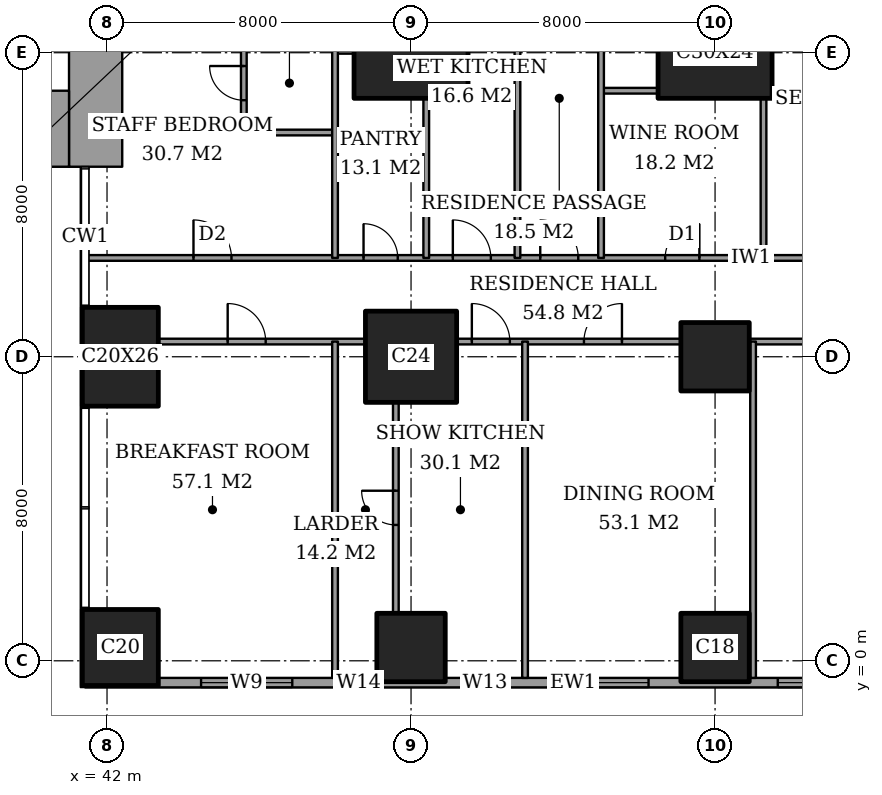
"""IFC4 building model, lengths in metres.
Left out: names, types, materials, properties, quantities, classifications, styles, units other than length and angle.
Written with IfcOpenShell. Run it as: python <this file> out.ifc"""

import sys

from ifc_helpers import new_model, si_unit, direction, frame, frame_2d, origin, origin_2d, place, context, subcontext, project, spatial, rectangle, extrude, element, fill, save


model = new_model("IFC4")
c1 = context("Model", 3, precision=1e-05, world=origin(), true_north=direction((0.0, 1.0)))
c2 = subcontext(c1, "Body", "Model", "MODEL_VIEW")
j1 = project(units=[si_unit("LENGTHUNIT", "METRE"), si_unit("PLANEANGLEUNIT", "RADIAN")], contexts=[c1])
p1 = place(None, origin())
s1 = spatial("IfcSite", under=j1, at=p1, CompositionType="ELEMENT")
p2 = place(p1, origin())
s2 = spatial("IfcBuilding", under=s1, at=p2, CompositionType="ELEMENT")
p3 = place(p2, frame((0.0, 0.0, 193.0)))
s3 = spatial("IfcBuildingStorey", under=s2, at=p3, CompositionType="ELEMENT", Elevation=193.0)
p4 = place(p3, frame((42.35, 0.35, 0.0), z_axis=(0.0, 0.0, 1.0), x_axis=(1.0, 0.0, 0.0)))
e1 = element("IfcColumn", 1, at=p4, inside=s3, PredefinedType="COLUMN", context=c2, shape_type="SweptSolid", body=[
    extrude(rectangle(XDim=2.0, YDim=2.0, at=origin_2d()), origin(), (0.0, 0.0, 1.0), 3.6),
])
p5 = place(p3, frame((42.35, 8.0, 0.0), z_axis=(0.0, 0.0, 1.0), x_axis=(1.0, 0.0, 0.0)))
e2 = element("IfcColumn", 2, at=p5, inside=s3, PredefinedType="COLUMN", context=c2, shape_type="SweptSolid", body=[
    extrude(rectangle(XDim=2.0, YDim=2.6, at=origin_2d()), origin(), (0.0, 0.0, 1.0), 3.6),
])
p6 = place(p3, frame((50.0, 0.35, 0.0), z_axis=(0.0, 0.0, 1.0), x_axis=(1.0, 0.0, 0.0)))
e3 = element("IfcColumn", 3, at=p6, inside=s3, PredefinedType="COLUMN", context=c2, shape_type="SweptSolid", body=[
    extrude(rectangle(XDim=1.8, YDim=1.8, at=origin_2d()), origin(), (0.0, 0.0, 1.0), 3.6),
])
p7 = place(p3, frame((50.0, 8.0, 0.0), z_axis=(0.0, 0.0, 1.0), x_axis=(1.0, 0.0, 0.0)))
e4 = element("IfcColumn", 4, at=p7, inside=s3, PredefinedType="COLUMN", context=c2, shape_type="SweptSolid", body=[
    extrude(rectangle(XDim=2.4, YDim=2.4, at=origin_2d()), origin(), (0.0, 0.0, 1.0), 3.6),
])
p8 = place(p3, frame((50.0, 16.0, 0.0), z_axis=(0.0, 0.0, 1.0), x_axis=(1.0, 0.0, 0.0)))
e5 = element("IfcColumn", 5, at=p8, inside=s3, PredefinedType="COLUMN", context=c2, shape_type="SweptSolid", body=[
    extrude(rectangle(XDim=3.0, YDim=2.4, at=origin_2d()), origin(), (0.0, 0.0, 1.0), 3.6),
])
for number, where, z_axis, x_axis in (
    (6, (58.0, 0.35, 0.0), (0.0, 0.0, 1.0), (1.0, 0.0, 0.0)),
    (7, (58.0, 8.0, 0.0), (0.0, 0.0, 1.0), (1.0, 0.0, 0.0)),
):
    element("IfcColumn", number, at=place(p3, frame(where, z_axis=z_axis, x_axis=x_axis)), inside=s3, PredefinedType="COLUMN", context=c2, shape_type="SweptSolid", body=[
        extrude(rectangle(XDim=1.8, YDim=1.8, at=origin_2d()), origin(), (0.0, 0.0, 1.0), 3.6),
    ])
p9 = place(p3, frame((58.0, 16.0, 0.0), z_axis=(0.0, 0.0, 1.0), x_axis=(1.0, 0.0, 0.0)))
e8 = element("IfcColumn", 8, at=p9, inside=s3, PredefinedType="COLUMN", context=c2, shape_type="SweptSolid", body=[
    extrude(rectangle(XDim=3.0, YDim=2.4, at=origin_2d()), origin(), (0.0, 0.0, 1.0), 3.6),
])
p10 = place(p3, frame((37.85, 14.0, 0.0), z_axis=(0.0, 0.0, 1.0), x_axis=(1.0, 0.0, 0.0)))
e9 = element("IfcWall", 9, at=p10, inside=s3, PredefinedType="SHEAR", context=c2, shape_type="SweptSolid", body=[
    extrude(rectangle(XDim=3.15, YDim=2.0, at=frame_2d((1.575, 0.0))), origin(), (0.0, 0.0, 1.0), 3.6),
])
p11 = place(p3, frame((41.7, 13.0, 0.0), z_axis=(0.0, 0.0, 1.0), x_axis=(0.0, 1.0, 0.0)))
e10 = element("IfcWall", 10, at=p11, inside=s3, PredefinedType="SHEAR", context=c2, shape_type="SweptSolid", body=[
    extrude(rectangle(XDim=11.85, YDim=1.4, at=frame_2d((5.925, 0.0))), origin(), (0.0, 0.0, 1.0), 3.6),
])
p12 = place(p11, frame((7.5, 0.0, 0.0)))
e11 = element("IfcOpeningElement", 11, at=p12, cuts=e10, PredefinedType="OPENING", context=c2, shape_type="SweptSolid", body=[
    extrude(rectangle(XDim=1.8, YDim=2.4, at=frame_2d((0.9, 1.2))), frame((0.0, 0.71, 0.0), z_axis=(0.0, -1.0, 0.0), x_axis=(1.0, 0.0, 0.0)), (0.0, 0.0, 1.0), 1.42),
])
p13 = place(p3, frame((41.425, -0.575, 0.0), z_axis=(0.0, 0.0, 1.0), x_axis=(1.0, 0.0, 0.0)))
e12 = element("IfcWall", 12, at=p13, inside=s3, PredefinedType="SOLIDWALL", context=c2, shape_type="SweptSolid", body=[
    extrude(rectangle(XDim=21.4, YDim=0.25, at=frame_2d((10.7, 0.0))), origin(), (0.0, 0.0, 1.0), 3.6),
])
p14 = place(p13, frame((3.05, 0.0, 0.2)))
e13 = element("IfcOpeningElement", 13, at=p14, cuts=e12, PredefinedType="OPENING", context=c2, shape_type="SweptSolid", body=[
    extrude(rectangle(XDim=2.4, YDim=2.4, at=frame_2d((1.2, 1.2))), frame((0.0, 0.135, 0.0), z_axis=(0.0, -1.0, 0.0), x_axis=(1.0, 0.0, 0.0)), (0.0, 0.0, 1.0), 0.27),
])
p15 = place(p13, frame((6.9, 0.0, 0.2)))
e14 = element("IfcOpeningElement", 14, at=p15, cuts=e12, PredefinedType="OPENING", context=c2, shape_type="SweptSolid", body=[
    extrude(rectangle(XDim=0.6, YDim=2.4, at=frame_2d((0.3, 1.2))), frame((0.0, 0.135, 0.0), z_axis=(0.0, -1.0, 0.0), x_axis=(1.0, 0.0, 0.0)), (0.0, 0.0, 1.0), 0.27),
])
p16 = place(p13, frame((9.925, 0.0, 0.2)))
e15 = element("IfcOpeningElement", 15, at=p16, cuts=e12, PredefinedType="OPENING", context=c2, shape_type="SweptSolid", body=[
    extrude(rectangle(XDim=1.2, YDim=2.4, at=frame_2d((0.6, 1.2))), frame((0.0, 0.135, 0.0), z_axis=(0.0, -1.0, 0.0), x_axis=(1.0, 0.0, 0.0)), (0.0, 0.0, 1.0), 0.27),
])
p17 = place(p13, frame((12.425, 0.0, 0.2)))
e16 = element("IfcOpeningElement", 16, at=p17, cuts=e12, PredefinedType="OPENING", context=c2, shape_type="SweptSolid", body=[
    extrude(rectangle(XDim=2.4, YDim=2.4, at=frame_2d((1.2, 1.2))), frame((0.0, 0.135, 0.0), z_axis=(0.0, -1.0, 0.0), x_axis=(1.0, 0.0, 0.0)), (0.0, 0.0, 1.0), 0.27),
])
p18 = place(p13, frame((18.225, 0.0, 0.2)))
e17 = element("IfcOpeningElement", 17, at=p18, cuts=e12, PredefinedType="OPENING", context=c2, shape_type="SweptSolid", body=[
    extrude(rectangle(XDim=2.4, YDim=2.4, at=frame_2d((1.2, 1.2))), frame((0.0, 0.135, 0.0), z_axis=(0.0, -1.0, 0.0), x_axis=(1.0, 0.0, 0.0)), (0.0, 0.0, 1.0), 0.27),
])
p19 = place(p3, frame((43.35, 8.4, 0.0), z_axis=(0.0, 0.0, 1.0), x_axis=(1.0, 0.0, 0.0)))
e18 = element("IfcWall", 18, at=p19, inside=s3, PredefinedType="PARTITIONING", context=c2, shape_type="SweptSolid", body=[
    extrude(rectangle(XDim=5.45, YDim=0.15, at=frame_2d((2.725, 0.0))), origin(), (0.0, 0.0, 1.0), 3.35),
])
p20 = place(p19, frame((1.825, 0.0, 0.0)))
e19 = element("IfcOpeningElement", 19, at=p20, cuts=e18, PredefinedType="OPENING", context=c2, shape_type="SweptSolid", body=[
    extrude(rectangle(XDim=1.0, YDim=2.1, at=frame_2d((0.5, 1.05))), frame((0.0, 0.085, 0.0), z_axis=(0.0, -1.0, 0.0), x_axis=(1.0, 0.0, 0.0)), (0.0, 0.0, 1.0), 0.17),
])
p21 = place(p3, frame((51.2, 8.4, 0.0), z_axis=(0.0, 0.0, 1.0), x_axis=(1.0, 0.0, 0.0)))
e20 = element("IfcWall", 20, at=p21, inside=s3, PredefinedType="PARTITIONING", context=c2, shape_type="SweptSolid", body=[
    extrude(rectangle(XDim=5.9, YDim=0.15, at=frame_2d((2.95, 0.0))), origin(), (0.0, 0.0, 1.0), 3.35),
])
p22 = place(p21, frame((3.35, 0.0, 0.0)))
e21 = element("IfcOpeningElement", 21, at=p22, cuts=e20, PredefinedType="OPENING", context=c2, shape_type="SweptSolid", body=[
    extrude(rectangle(XDim=1.0, YDim=2.1, at=frame_2d((0.5, 1.05))), frame((0.0, 0.085, 0.0), z_axis=(0.0, -1.0, 0.0), x_axis=(1.0, 0.0, 0.0)), (0.0, 0.0, 1.0), 0.17),
])
p23 = place(p21, frame((0.4, 0.0, 0.0)))
e22 = element("IfcOpeningElement", 22, at=p23, cuts=e20, PredefinedType="OPENING", context=c2, shape_type="SweptSolid", body=[
    extrude(rectangle(XDim=1.0, YDim=2.1, at=frame_2d((0.5, 1.05))), frame((0.0, 0.085, 0.0), z_axis=(0.0, -1.0, 0.0), x_axis=(1.0, 0.0, 0.0)), (0.0, 0.0, 1.0), 0.17),
])
p24 = place(p3, frame((58.9, 8.4, 0.0), z_axis=(0.0, 0.0, 1.0), x_axis=(1.0, 0.0, 0.0)))
e23 = element("IfcWall", 23, at=p24, inside=s3, PredefinedType="PARTITIONING", context=c2, shape_type="SweptSolid", body=[
    extrude(rectangle(XDim=5.85, YDim=0.15, at=frame_2d((2.925, 0.0))), origin(), (0.0, 0.0, 1.0), 3.35),
])
p25 = place(p24, frame((2.475, 0.0, 0.0)))
e24 = element("IfcOpeningElement", 24, at=p25, cuts=e23, PredefinedType="OPENING", context=c2, shape_type="SweptSolid", body=[
    extrude(rectangle(XDim=1.0, YDim=2.1, at=frame_2d((0.5, 1.05))), frame((0.0, 0.085, 0.0), z_axis=(0.0, -1.0, 0.0), x_axis=(1.0, 0.0, 0.0)), (0.0, 0.0, 1.0), 0.17),
])
p26 = place(p3, frame((41.439, 10.6, 0.0), z_axis=(0.0, 0.0, 1.0), x_axis=(1.0, 0.0, 0.0)))
e25 = element("IfcWall", 25, at=p26, inside=s3, PredefinedType="PARTITIONING", context=c2, shape_type="SweptSolid", body=[
    extrude(rectangle(XDim=25.011, YDim=0.15, at=frame_2d((12.505, 0.0))), origin(), (0.0, 0.0, 1.0), 3.35),
])
p27 = place(p26, frame((11.961, 0.0, 0.0)))
e26 = element("IfcOpeningElement", 26, at=p27, cuts=e25, PredefinedType="OPENING", context=c2, shape_type="SweptSolid", body=[
    extrude(rectangle(XDim=1.0, YDim=2.1, at=frame_2d((0.5, 1.05))), frame((0.0, 0.085, 0.0), z_axis=(0.0, -1.0, 0.0), x_axis=(1.0, 0.0, 0.0)), (0.0, 0.0, 1.0), 0.17),
])
p28 = place(p26, frame((20.924, 0.0, 0.0)))
e27 = element("IfcOpeningElement", 27, at=p28, cuts=e25, PredefinedType="OPENING", context=c2, shape_type="SweptSolid", body=[
    extrude(rectangle(XDim=1.0, YDim=2.1, at=frame_2d((0.5, 1.05))), frame((0.0, 0.085, 0.0), z_axis=(0.0, -1.0, 0.0), x_axis=(1.0, 0.0, 0.0)), (0.0, 0.0, 1.0), 0.17),
])
p29 = place(p26, frame((15.249, 0.0, 0.0)))
e28 = element("IfcOpeningElement", 28, at=p29, cuts=e25, PredefinedType="OPENING", context=c2, shape_type="SweptSolid", body=[
    extrude(rectangle(XDim=0.9, YDim=2.1, at=frame_2d((0.45, 1.05))), frame((0.0, 0.085, 0.0), z_axis=(0.0, -1.0, 0.0), x_axis=(1.0, 0.0, 0.0)), (0.0, 0.0, 1.0), 0.17),
])
p30 = place(p26, frame((9.661, 0.0, 0.0)))
e29 = element("IfcOpeningElement", 29, at=p30, cuts=e25, PredefinedType="OPENING", context=c2, shape_type="SweptSolid", body=[
    extrude(rectangle(XDim=1.0, YDim=2.1, at=frame_2d((0.5, 1.05))), frame((0.0, 0.085, 0.0), z_axis=(0.0, -1.0, 0.0), x_axis=(1.0, 0.0, 0.0)), (0.0, 0.0, 1.0), 0.17),
])
p31 = place(p26, frame((7.311, 0.0, 0.0)))
e30 = element("IfcOpeningElement", 30, at=p31, cuts=e25, PredefinedType="OPENING", context=c2, shape_type="SweptSolid", body=[
    extrude(rectangle(XDim=0.9, YDim=2.1, at=frame_2d((0.45, 1.05))), frame((0.0, 0.085, 0.0), z_axis=(0.0, -1.0, 0.0), x_axis=(1.0, 0.0, 0.0)), (0.0, 0.0, 1.0), 0.17),
])
p32 = place(p26, frame((2.836, 0.0, 0.0)))
e31 = element("IfcOpeningElement", 31, at=p32, cuts=e25, PredefinedType="OPENING", context=c2, shape_type="SweptSolid", body=[
    extrude(rectangle(XDim=1.0, YDim=2.1, at=frame_2d((0.5, 1.05))), frame((0.0, 0.085, 0.0), z_axis=(0.0, -1.0, 0.0), x_axis=(1.0, 0.0, 0.0)), (0.0, 0.0, 1.0), 0.17),
])
p33 = place(p3, frame((45.6, 13.9, 0.0), z_axis=(0.0, 0.0, 1.0), x_axis=(1.0, 0.0, 0.0)))
e32 = element("IfcWall", 32, at=p33, inside=s3, PredefinedType="PARTITIONING", context=c2, shape_type="SweptSolid", body=[
    extrude(rectangle(XDim=2.4, YDim=0.15, at=frame_2d((1.2, 0.0))), origin(), (0.0, 0.0, 1.0), 3.35),
])
p34 = place(p3, frame((55.0, 15.0, 0.0), z_axis=(0.0, 0.0, 1.0), x_axis=(1.0, 0.0, 0.0)))
e33 = element("IfcWall", 33, at=p34, inside=s3, PredefinedType="PARTITIONING", context=c2, shape_type="SweptSolid", body=[
    extrude(rectangle(XDim=1.5, YDim=0.15, at=frame_2d((0.75, 0.0))), origin(), (0.0, 0.0, 1.0), 3.35),
])
p35 = place(p3, frame((48.0, 16.05, 0.0), z_axis=(0.0, 0.0, 1.0), x_axis=(1.0, 0.0, 0.0)))
e34 = element("IfcWall", 34, at=p35, inside=s3, PredefinedType="PARTITIONING", context=c2, shape_type="SweptSolid", body=[
    extrude(rectangle(XDim=0.5, YDim=0.15, at=frame_2d((0.25, 0.0))), origin(), (0.0, 0.0, 1.0), 2.634),
])
p36 = place(p3, frame((45.6, 13.9, 0.0), z_axis=(0.0, 0.0, 1.0), x_axis=(0.0, 1.0, 0.0)))
e35 = element("IfcWall", 35, at=p36, inside=s3, PredefinedType="PARTITIONING", context=c2, shape_type="SweptSolid", body=[
    extrude(rectangle(XDim=2.6, YDim=0.15, at=frame_2d((1.3, 0.0))), origin(), (0.0, 0.0, 1.0), 3.35),
])
p37 = place(p36, frame((0.85, 0.0, 0.0)))
e36 = element("IfcOpeningElement", 36, at=p37, cuts=e35, PredefinedType="OPENING", context=c2, shape_type="SweptSolid", body=[
    extrude(rectangle(XDim=0.9, YDim=2.1, at=frame_2d((0.45, 1.05))), frame((0.0, 0.085, 0.0), z_axis=(0.0, -1.0, 0.0), x_axis=(1.0, 0.0, 0.0)), (0.0, 0.0, 1.0), 0.17),
])
p38 = place(p3, frame((48.0, -0.45, 0.0), z_axis=(0.0, 0.0, 1.0), x_axis=(0.0, 1.0, 0.0)))
e37 = element("IfcWall", 37, at=p38, inside=s3, PredefinedType="PARTITIONING", context=c2, shape_type="SweptSolid", body=[
    extrude(rectangle(XDim=8.85, YDim=0.15, at=frame_2d((4.425, 0.0))), origin(), (0.0, 0.0, 1.0), 3.35),
])
p39 = place(p3, frame((48.0, 10.6, 0.0), z_axis=(0.0, 0.0, 1.0), x_axis=(0.0, 1.0, 0.0)))
e38 = element("IfcWall", 38, at=p39, inside=s3, PredefinedType="PARTITIONING", context=c2, shape_type="SweptSolid", body=[
    extrude(rectangle(XDim=8.4, YDim=0.15, at=frame_2d((4.2, 0.0))), origin(), (0.0, 0.0, 1.0), 3.35),
])
p40 = place(p39, frame((6.7, 0.0, 0.0)))
e39 = element("IfcOpeningElement", 39, at=p40, cuts=e38, PredefinedType="OPENING", context=c2, shape_type="SweptSolid", body=[
    extrude(rectangle(XDim=0.9, YDim=2.1, at=frame_2d((0.45, 1.05))), frame((0.0, 0.085, 0.0), z_axis=(0.0, -1.0, 0.0), x_axis=(1.0, 0.0, 0.0)), (0.0, 0.0, 1.0), 0.17),
])
p41 = place(p3, frame((49.6, 1.25, 0.0), z_axis=(0.0, 0.0, 1.0), x_axis=(0.0, 1.0, 0.0)))
e40 = element("IfcWall", 40, at=p41, inside=s3, PredefinedType="PARTITIONING", context=c2, shape_type="SweptSolid", body=[
    extrude(rectangle(XDim=5.55, YDim=0.15, at=frame_2d((2.775, 0.0))), origin(), (0.0, 0.0, 1.0), 3.35),
])
p42 = place(p41, frame((2.325, 0.0, 0.0)))
e41 = element("IfcOpeningElement", 41, at=p42, cuts=e40, PredefinedType="OPENING", context=c2, shape_type="SweptSolid", body=[
    extrude(rectangle(XDim=0.9, YDim=2.1, at=frame_2d((0.45, 1.05))), frame((0.0, 0.085, 0.0), z_axis=(0.0, -1.0, 0.0), x_axis=(1.0, 0.0, 0.0)), (0.0, 0.0, 1.0), 0.17),
])
p43 = place(p3, frame((50.4, 10.6, 0.0), z_axis=(0.0, 0.0, 1.0), x_axis=(0.0, 1.0, 0.0)))
e42 = element("IfcWall", 42, at=p43, inside=s3, PredefinedType="PARTITIONING", context=c2, shape_type="SweptSolid", body=[
    extrude(rectangle(XDim=4.2, YDim=0.15, at=frame_2d((2.1, 0.0))), origin(), (0.0, 0.0, 1.0), 3.35),
])
p44 = place(p3, frame((52.8, 10.6, 0.0), z_axis=(0.0, 0.0, 1.0), x_axis=(0.0, 1.0, 0.0)))
e43 = element("IfcWall", 43, at=p44, inside=s3, PredefinedType="PARTITIONING", context=c2, shape_type="SweptSolid", body=[
    extrude(rectangle(XDim=8.4, YDim=0.15, at=frame_2d((4.2, 0.0))), origin(), (0.0, 0.0, 1.0), 3.35),
])
p45 = place(p3, frame((53.0, -0.45, 0.0), z_axis=(0.0, 0.0, 1.0), x_axis=(0.0, 1.0, 0.0)))
e44 = element("IfcWall", 44, at=p45, inside=s3, PredefinedType="PARTITIONING", context=c2, shape_type="SweptSolid", body=[
    extrude(rectangle(XDim=8.85, YDim=0.15, at=frame_2d((4.425, 0.0))), origin(), (0.0, 0.0, 1.0), 3.35),
])
p46 = place(p3, frame((55.0, 10.6, 0.0), z_axis=(0.0, 0.0, 1.0), x_axis=(0.0, 1.0, 0.0)))
e45 = element("IfcWall", 45, at=p46, inside=s3, PredefinedType="PARTITIONING", context=c2, shape_type="SweptSolid", body=[
    extrude(rectangle(XDim=11.0, YDim=0.15, at=frame_2d((5.5, 0.0))), origin(), (0.0, 0.0, 1.0), 3.35),
])
p47 = place(p46, frame((9.2, 0.0, 0.0)))
e46 = element("IfcOpeningElement", 46, at=p47, cuts=e45, PredefinedType="OPENING", context=c2, shape_type="SweptSolid", body=[
    extrude(rectangle(XDim=1.0, YDim=2.1, at=frame_2d((0.5, 1.05))), frame((0.0, 0.085, 0.0), z_axis=(0.0, -1.0, 0.0), x_axis=(1.0, 0.0, 0.0)), (0.0, 0.0, 1.0), 0.17),
])
p48 = place(p3, frame((59.0, -0.45, 0.0), z_axis=(0.0, 0.0, 1.0), x_axis=(0.0, 1.0, 0.0)))
e47 = element("IfcWall", 47, at=p48, inside=s3, PredefinedType="PARTITIONING", context=c2, shape_type="SweptSolid", body=[
    extrude(rectangle(XDim=8.85, YDim=0.15, at=frame_2d((4.425, 0.0))), origin(), (0.0, 0.0, 1.0), 3.35),
])
p49 = place(p3, frame((59.275, 10.6, 0.0), z_axis=(0.0, 0.0, 1.0), x_axis=(0.0, 1.0, 0.0)))
e48 = element("IfcWall", 48, at=p49, inside=s3, PredefinedType="PARTITIONING", context=c2, shape_type="SweptSolid", body=[
    extrude(rectangle(XDim=4.2, YDim=0.15, at=frame_2d((2.1, 0.0))), origin(), (0.0, 0.0, 1.0), 3.35),
])
p50 = place(p14, origin())
e49 = element("IfcWindow", 49, at=p50, inside=s3, PartitioningType="SINGLE_PANEL", PredefinedType="WINDOW", context=c2, shape_type="SweptSolid", body=[
    extrude(rectangle(XDim=2.4, YDim=2.4, at=frame_2d((1.2, 1.2))), frame((0.0, 0.03, 0.0), z_axis=(0.0, -1.0, 0.0), x_axis=(1.0, 0.0, 0.0)), (0.0, 0.0, 1.0), 0.06),
])
fill(e13, e49)
p51 = place(p15, origin())
e50 = element("IfcWindow", 50, at=p51, inside=s3, PartitioningType="SINGLE_PANEL", PredefinedType="WINDOW", context=c2, shape_type="SweptSolid", body=[
    extrude(rectangle(XDim=0.6, YDim=2.4, at=frame_2d((0.3, 1.2))), frame((0.0, 0.03, 0.0), z_axis=(0.0, -1.0, 0.0), x_axis=(1.0, 0.0, 0.0)), (0.0, 0.0, 1.0), 0.06),
])
fill(e14, e50)
p52 = place(p16, origin())
e51 = element("IfcWindow", 51, at=p52, inside=s3, PartitioningType="SINGLE_PANEL", PredefinedType="WINDOW", context=c2, shape_type="SweptSolid", body=[
    extrude(rectangle(XDim=1.2, YDim=2.4, at=frame_2d((0.6, 1.2))), frame((0.0, 0.03, 0.0), z_axis=(0.0, -1.0, 0.0), x_axis=(1.0, 0.0, 0.0)), (0.0, 0.0, 1.0), 0.06),
])
fill(e15, e51)
p53 = place(p17, origin())
e52 = element("IfcWindow", 52, at=p53, inside=s3, PartitioningType="SINGLE_PANEL", PredefinedType="WINDOW", context=c2, shape_type="SweptSolid", body=[
    extrude(rectangle(XDim=2.4, YDim=2.4, at=frame_2d((1.2, 1.2))), frame((0.0, 0.03, 0.0), z_axis=(0.0, -1.0, 0.0), x_axis=(1.0, 0.0, 0.0)), (0.0, 0.0, 1.0), 0.06),
])
fill(e16, e52)
p54 = place(p18, origin())
e53 = element("IfcWindow", 53, at=p54, inside=s3, PartitioningType="SINGLE_PANEL", PredefinedType="WINDOW", context=c2, shape_type="SweptSolid", body=[
    extrude(rectangle(XDim=2.4, YDim=2.4, at=frame_2d((1.2, 1.2))), frame((0.0, 0.03, 0.0), z_axis=(0.0, -1.0, 0.0), x_axis=(1.0, 0.0, 0.0)), (0.0, 0.0, 1.0), 0.06),
])
fill(e17, e53)
p55 = place(p22, origin())
e54 = element("IfcDoor", 54, at=p55, inside=s3, OperationType="SINGLE_SWING_LEFT", PredefinedType="DOOR", context=c2, shape_type="SweptSolid", body=[
    extrude(rectangle(XDim=1.0, YDim=2.1, at=frame_2d((0.5, 1.05))), frame((0.0, 0.025, 0.0), z_axis=(0.0, -1.0, 0.0), x_axis=(1.0, 0.0, 0.0)), (0.0, 0.0, 1.0), 0.05),
])
fill(e21, e54)
p56 = place(p23, origin())
e55 = element("IfcDoor", 55, at=p56, inside=s3, OperationType="SINGLE_SWING_RIGHT", PredefinedType="DOOR", context=c2, shape_type="SweptSolid", body=[
    extrude(rectangle(XDim=1.0, YDim=2.1, at=frame_2d((0.5, 1.05))), frame((0.0, 0.025, 0.0), z_axis=(0.0, -1.0, 0.0), x_axis=(1.0, 0.0, 0.0)), (0.0, 0.0, 1.0), 0.05),
])
fill(e22, e55)
p57 = place(p42, origin())
e56 = element("IfcDoor", 56, at=p57, inside=s3, OperationType="SINGLE_SWING_LEFT", PredefinedType="DOOR", context=c2, shape_type="SweptSolid", body=[
    extrude(rectangle(XDim=0.9, YDim=2.1, at=frame_2d((0.45, 1.05))), frame((0.0, 0.025, 0.0), z_axis=(0.0, -1.0, 0.0), x_axis=(1.0, 0.0, 0.0)), (0.0, 0.0, 1.0), 0.05),
])
fill(e41, e56)
p58 = place(p20, origin())
e57 = element("IfcDoor", 57, at=p58, inside=s3, OperationType="SINGLE_SWING_RIGHT", PredefinedType="DOOR", context=c2, shape_type="SweptSolid", body=[
    extrude(rectangle(XDim=1.0, YDim=2.1, at=frame_2d((0.5, 1.05))), frame((0.0, 0.025, 0.0), z_axis=(0.0, -1.0, 0.0), x_axis=(1.0, 0.0, 0.0)), (0.0, 0.0, 1.0), 0.05),
])
fill(e19, e57)
p59 = place(p27, origin())
e58 = element("IfcDoor", 58, at=p59, inside=s3, OperationType="SINGLE_SWING_RIGHT", PredefinedType="DOOR", context=c2, shape_type="SweptSolid", body=[
    extrude(rectangle(XDim=1.0, YDim=2.1, at=frame_2d((0.5, 1.05))), frame((0.0, 0.025, 0.0), z_axis=(0.0, -1.0, 0.0), x_axis=(1.0, 0.0, 0.0)), (0.0, 0.0, 1.0), 0.05),
])
fill(e26, e58)
p60 = place(p29, origin())
e59 = element("IfcDoor", 59, at=p60, inside=s3, OperationType="SINGLE_SWING_LEFT", PredefinedType="DOOR", context=c2, shape_type="SweptSolid", body=[
    extrude(rectangle(XDim=0.9, YDim=2.1, at=frame_2d((0.45, 1.05))), frame((0.0, 0.025, 0.0), z_axis=(0.0, -1.0, 0.0), x_axis=(1.0, 0.0, 0.0)), (0.0, 0.0, 1.0), 0.05),
])
fill(e28, e59)
p61 = place(p30, origin())
e60 = element("IfcDoor", 60, at=p61, inside=s3, OperationType="SINGLE_SWING_RIGHT", PredefinedType="DOOR", context=c2, shape_type="SweptSolid", body=[
    extrude(rectangle(XDim=1.0, YDim=2.1, at=frame_2d((0.5, 1.05))), frame((0.0, 0.025, 0.0), z_axis=(0.0, -1.0, 0.0), x_axis=(1.0, 0.0, 0.0)), (0.0, 0.0, 1.0), 0.05),
])
fill(e29, e60)
p62 = place(p31, origin())
e61 = element("IfcDoor", 61, at=p62, inside=s3, OperationType="SINGLE_SWING_RIGHT", PredefinedType="DOOR", context=c2, shape_type="SweptSolid", body=[
    extrude(rectangle(XDim=0.9, YDim=2.1, at=frame_2d((0.45, 1.05))), frame((0.0, 0.025, 0.0), z_axis=(0.0, -1.0, 0.0), x_axis=(1.0, 0.0, 0.0)), (0.0, 0.0, 1.0), 0.05),
])
fill(e30, e61)
p63 = place(p37, origin())
e62 = element("IfcDoor", 62, at=p63, inside=s3, OperationType="SINGLE_SWING_LEFT", PredefinedType="DOOR", context=c2, shape_type="SweptSolid", body=[
    extrude(rectangle(XDim=0.9, YDim=2.1, at=frame_2d((0.45, 1.05))), frame((0.0, 0.025, 0.0), z_axis=(0.0, -1.0, 0.0), x_axis=(1.0, 0.0, 0.0)), (0.0, 0.0, 1.0), 0.05),
])
fill(e36, e62)
p64 = place(p32, origin())
e63 = element("IfcDoor", 63, at=p64, inside=s3, OperationType="SINGLE_SWING_RIGHT", PredefinedType="DOOR", context=c2, shape_type="SweptSolid", body=[
    extrude(rectangle(XDim=1.0, YDim=2.1, at=frame_2d((0.5, 1.05))), frame((0.0, 0.025, 0.0), z_axis=(0.0, -1.0, 0.0), x_axis=(1.0, 0.0, 0.0)), (0.0, 0.0, 1.0), 0.05),
])
fill(e31, e63)
save(model, sys.argv[1])
